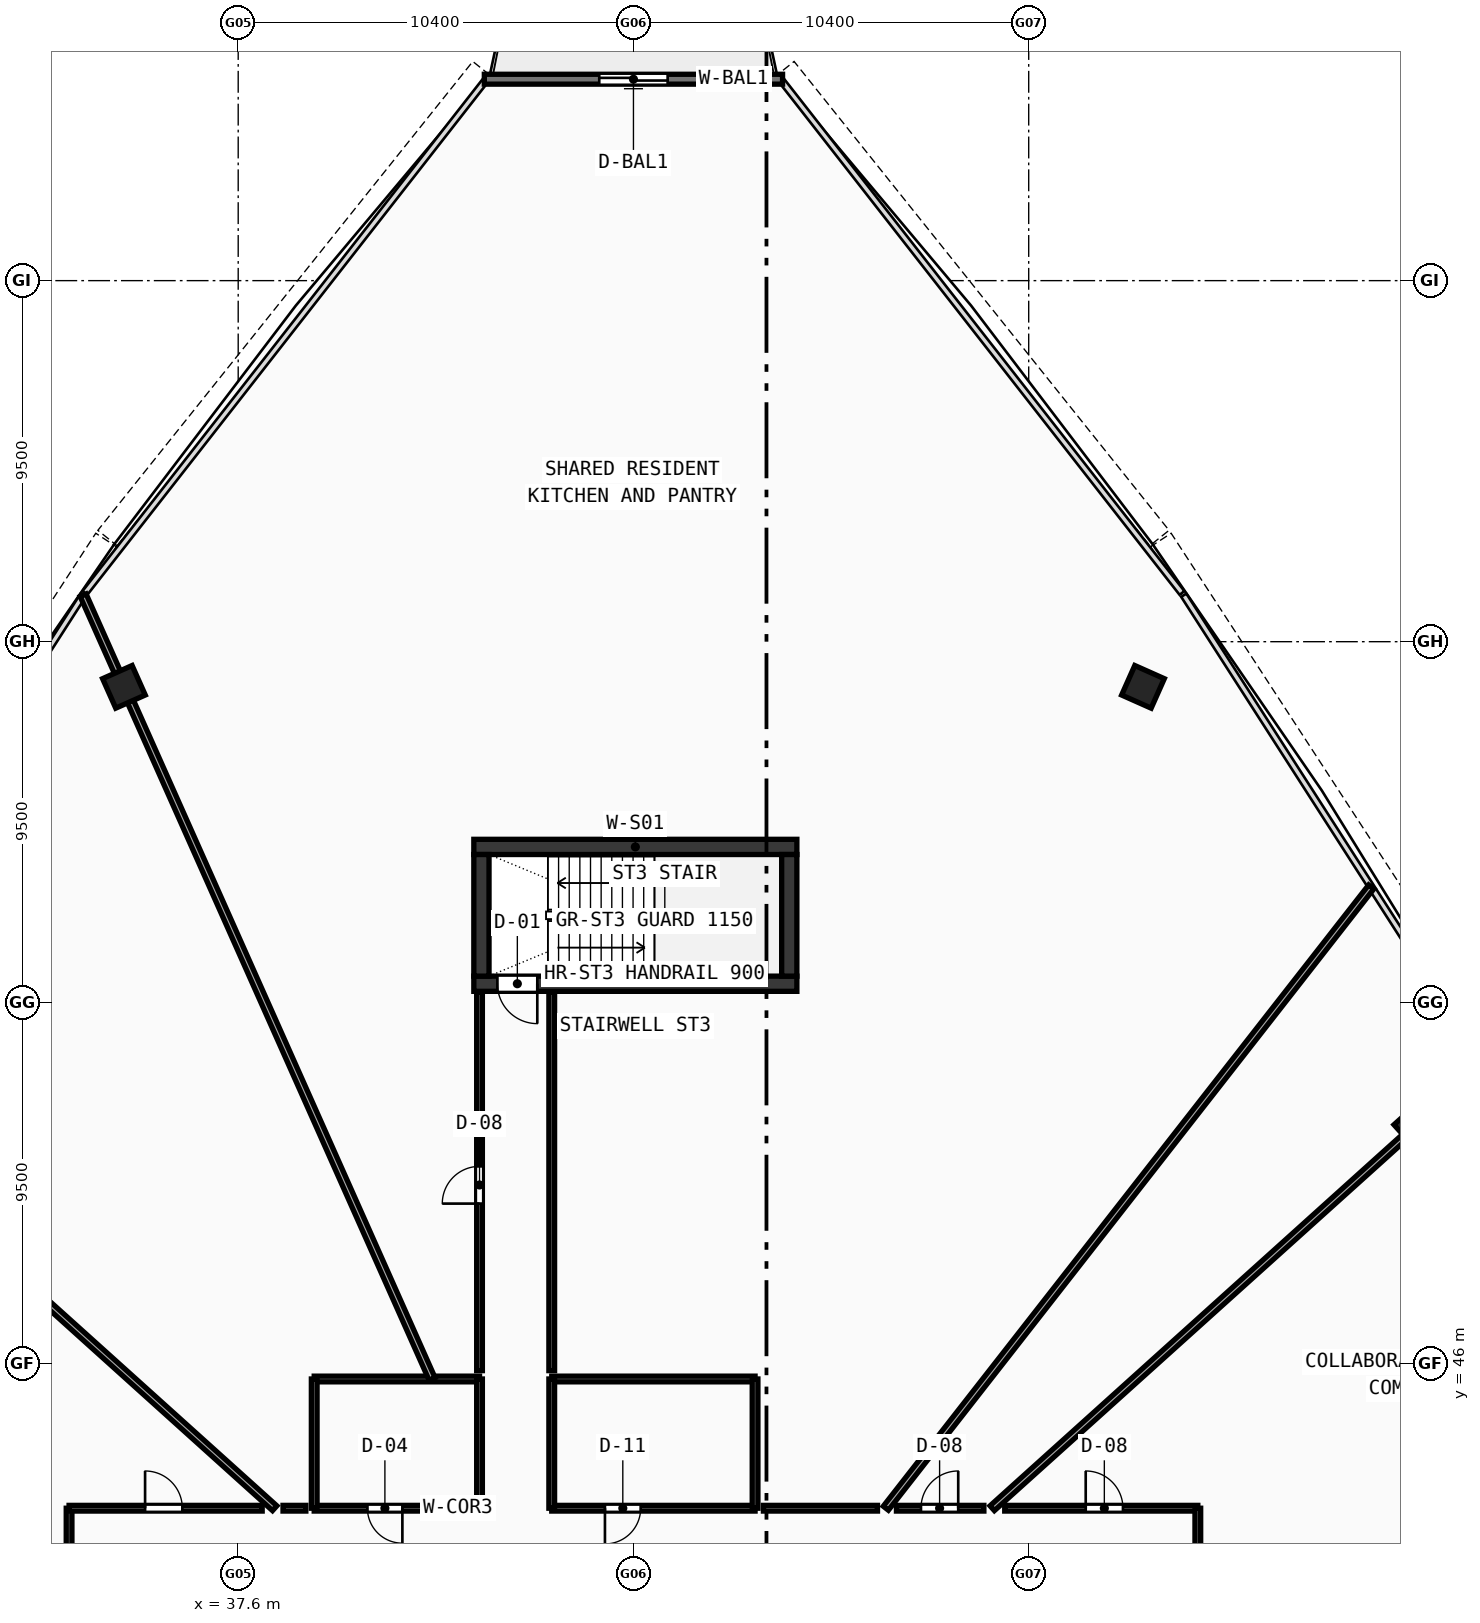
"""IFC4 building model, lengths in metres.
Left out: names, types, materials, properties, quantities, classifications, styles, units other than length and angle.
Written with IfcOpenShell. Run it as: python <this file> out.ifc"""

import sys

from ifc_helpers import new_model, si_unit, direction, frame, frame_2d, origin, origin_with_axes, origin_2d, place, context, subcontext, project, spatial, rectangle, hollow_rectangle, extrude, source, transform, mapped, element, fill, save


model = new_model("IFC4")
c1 = context("Model", 3, precision=1e-05, world=origin(), true_north=direction((0.0, 1.0)))
c2 = subcontext(c1, "Body", "Model", "MODEL_VIEW")
j1 = project(units=[si_unit("LENGTHUNIT", "METRE"), si_unit("PLANEANGLEUNIT", "RADIAN")], contexts=[c1])
p1 = place(None, origin())
s1 = spatial("IfcSite", under=j1, at=p1, CompositionType="ELEMENT")
p2 = place(p1, origin())
s2 = spatial("IfcBuilding", under=s1, at=p2, CompositionType="ELEMENT")
p3 = place(p2, frame((0.0, 0.0, 244.53)))
s3 = spatial("IfcBuildingStorey", under=s2, at=p3, CompositionType="ELEMENT", Elevation=244.53)
p4 = place(p3, frame((43.8, 59.6, 0.0), z_axis=(0.0, 0.0, 1.0), x_axis=(1.0, 0.0, 0.0)))
e1 = element("IfcWall", 1, at=p4, inside=s3, PredefinedType="SHEAR", context=c2, shape_type="SweptSolid", body=[
    extrude(rectangle(XDim=8.5, YDim=0.4, at=frame_2d((4.25, 0.0))), origin(), (0.0, 0.0, 1.0), 3.47),
])
p5 = place(p3, frame((43.8, 56.0, 0.0), z_axis=(0.0, 0.0, 1.0), x_axis=(1.0, 0.0, 0.0)))
e2 = element("IfcWall", 2, at=p5, inside=s3, PredefinedType="SHEAR", context=c2, shape_type="SweptSolid", body=[
    extrude(rectangle(XDim=8.5, YDim=0.4, at=frame_2d((4.25, 0.0))), origin(), (0.0, 0.0, 1.0), 3.47),
])
p6 = place(p5, frame((0.62, 0.0, 0.0)))
e3 = element("IfcOpeningElement", 3, at=p6, cuts=e2, PredefinedType="OPENING", context=c2, shape_type="SweptSolid", body=[
    extrude(rectangle(XDim=1.05, YDim=2.1, at=frame_2d((0.525, 1.05))), frame((0.0, 0.21, 0.0), z_axis=(0.0, -1.0, 0.0), x_axis=(1.0, 0.0, 0.0)), (0.0, 0.0, 1.0), 0.42),
])
for number, where, z_axis, x_axis in (
    (4, (44.0, 56.2, 0.0), (0.0, 0.0, 1.0), (0.0, 1.0, 0.0)),
    (5, (52.1, 56.2, 0.0), (0.0, 0.0, 1.0), (0.0, 1.0, 0.0)),
):
    element("IfcWall", number, at=place(p3, frame(where, z_axis=z_axis, x_axis=x_axis)), inside=s3, PredefinedType="SHEAR", context=c2, shape_type="SweptSolid", body=[
        extrude(rectangle(XDim=3.2, YDim=0.4, at=frame_2d((1.6, 0.0))), origin(), (0.0, 0.0, 1.0), 3.47),
    ])
m1 = source(origin(), c2, "Body", "SweptSolid", [
    extrude(hollow_rectangle(XDim=0.85, YDim=0.85, WallThickness=0.034, at=origin_2d()), origin(), (0.0, 0.0, 1.0), 3.73),
])
for number, where, z_axis, x_axis in (
    (6, (68.612, 52.259, -0.26), (0.0, 0.0, 1.0), (-0.669, 0.743, 0.0)),
    (7, (61.407, 63.812, -0.26), (0.0, 0.0, 1.0), (-0.914, 0.407, 0.0)),
    (8, (34.593, 63.812, -0.26), (0.0, 0.0, 1.0), (-0.914, -0.407, 0.0)),
):
    element("IfcColumn", number, at=place(p3, frame(where, z_axis=z_axis, x_axis=x_axis)), inside=s3, PredefinedType="COLUMN", context=c2, shape_type="MappedRepresentation", body=[
        mapped(m1, transform((0.0, 0.0, 0.0), scale=1.0)),
    ])
p7 = place(p3, frame((51.924, 79.8, 0.0), z_axis=(0.0, 0.0, 1.0), x_axis=(-1.0, 0.0, 0.0)))
e9 = element("IfcWall", 9, at=p7, inside=s3, PredefinedType="STANDARD", context=c2, shape_type="SweptSolid", body=[
    extrude(rectangle(XDim=7.847, YDim=0.26, at=frame_2d((3.924, 0.0))), origin(), (0.0, 0.0, 1.0), 3.47),
])
p8 = place(p7, frame((3.024, 0.0, 0.0)))
e10 = element("IfcOpeningElement", 10, at=p8, cuts=e9, PredefinedType="OPENING", context=c2, shape_type="SweptSolid", body=[
    extrude(rectangle(XDim=1.8, YDim=2.15, at=frame_2d((0.9, 1.075))), frame((0.0, 0.14, 0.0), z_axis=(0.0, -1.0, 0.0), x_axis=(1.0, 0.0, 0.0)), (0.0, 0.0, 1.0), 0.28),
])
p9 = place(p3, frame((39.6, 42.2, 0.0), z_axis=(0.0, 0.0, 1.0), x_axis=(1.0, 0.0, 0.0)))
e11 = element("IfcWall", 11, at=p9, inside=s3, PredefinedType="PARTITIONING", context=c2, shape_type="SweptSolid", body=[
    extrude(rectangle(XDim=4.35, YDim=0.15, at=frame_2d((2.175, 0.0))), origin(), (0.0, 0.0, 1.0), 3.47),
])
p10 = place(p9, frame((1.4, 0.0, 0.0)))
e12 = element("IfcOpeningElement", 12, at=p10, cuts=e11, PredefinedType="OPENING", context=c2, shape_type="SweptSolid", body=[
    extrude(rectangle(XDim=0.92, YDim=2.1, at=frame_2d((0.46, 1.05))), frame((0.0, 0.085, 0.0), z_axis=(0.0, -1.0, 0.0), x_axis=(1.0, 0.0, 0.0)), (0.0, 0.0, 1.0), 0.17),
])
p11 = place(p3, frame((39.6, 45.6, 0.0), z_axis=(0.0, 0.0, 1.0), x_axis=(1.0, 0.0, 0.0)))
e13 = element("IfcWall", 13, at=p11, inside=s3, PredefinedType="PARTITIONING", context=c2, shape_type="SweptSolid", body=[
    extrude(rectangle(XDim=4.35, YDim=0.15, at=frame_2d((2.175, 0.0))), origin(), (0.0, 0.0, 1.0), 2.82),
])
p12 = place(p3, frame((39.6, 42.2, 0.0), z_axis=(0.0, 0.0, 1.0), x_axis=(0.0, 1.0, 0.0)))
e14 = element("IfcWall", 14, at=p12, inside=s3, PredefinedType="PARTITIONING", context=c2, shape_type="SweptSolid", body=[
    extrude(rectangle(XDim=3.4, YDim=0.15, at=frame_2d((1.7, 0.0))), origin(), (0.0, 0.0, 1.0), 3.47),
])
p13 = place(p3, frame((43.95, 42.2, 0.0), z_axis=(0.0, 0.0, 1.0), x_axis=(0.0, 1.0, 0.0)))
e15 = element("IfcWall", 15, at=p13, inside=s3, PredefinedType="PARTITIONING", context=c2, shape_type="SweptSolid", body=[
    extrude(rectangle(XDim=3.4, YDim=0.15, at=frame_2d((1.7, 0.0))), origin(), (0.0, 0.0, 1.0), 2.82),
])
p14 = place(p3, frame((45.85, 42.2, 0.0), z_axis=(0.0, 0.0, 1.0), x_axis=(1.0, 0.0, 0.0)))
e16 = element("IfcWall", 16, at=p14, inside=s3, PredefinedType="PARTITIONING", context=c2, shape_type="SweptSolid", body=[
    extrude(rectangle(XDim=5.35, YDim=0.15, at=frame_2d((2.675, 0.0))), origin(), (0.0, 0.0, 1.0), 3.47),
])
p15 = place(p14, frame((1.4, 0.0, 0.0)))
e17 = element("IfcOpeningElement", 17, at=p15, cuts=e16, PredefinedType="OPENING", context=c2, shape_type="SweptSolid", body=[
    extrude(rectangle(XDim=0.94, YDim=2.1, at=frame_2d((0.47, 1.05))), frame((0.0, 0.085, 0.0), z_axis=(0.0, -1.0, 0.0), x_axis=(1.0, 0.0, 0.0)), (0.0, 0.0, 1.0), 0.17),
])
p16 = place(p3, frame((45.85, 45.6, 0.0), z_axis=(0.0, 0.0, 1.0), x_axis=(1.0, 0.0, 0.0)))
e18 = element("IfcWall", 18, at=p16, inside=s3, PredefinedType="PARTITIONING", context=c2, shape_type="SweptSolid", body=[
    extrude(rectangle(XDim=5.35, YDim=0.15, at=frame_2d((2.675, 0.0))), origin(), (0.0, 0.0, 1.0), 3.47),
])
for number, where, z_axis, x_axis in (
    (19, (45.85, 42.2, 0.0), (0.0, 0.0, 1.0), (0.0, 1.0, 0.0)),
    (20, (51.2, 42.2, 0.0), (0.0, 0.0, 1.0), (0.0, 1.0, 0.0)),
):
    element("IfcWall", number, at=place(p3, frame(where, z_axis=z_axis, x_axis=x_axis)), inside=s3, PredefinedType="PARTITIONING", context=c2, shape_type="SweptSolid", body=[
        extrude(rectangle(XDim=3.4, YDim=0.15, at=frame_2d((1.7, 0.0))), origin(), (0.0, 0.0, 1.0), 3.47),
    ])
p17 = place(p3, frame((62.85, 38.525, 0.0), z_axis=(0.0, 0.0, 1.0), x_axis=(0.951060404644, 0.309005027011, 0.0)))
e21 = element("IfcWall", 21, at=p17, inside=s3, PredefinedType="PARTITIONING", context=c2, shape_type="SweptSolid", body=[
    extrude(rectangle(XDim=14.032, YDim=0.17, at=frame_2d((7.016, 0.0))), origin(), (0.0, 0.0, 1.0), 2.82),
])
p18 = place(p3, frame((57.44, 42.2, 0.0), z_axis=(0.0, 0.0, 1.0), x_axis=(0.743140424774, 0.669135493802, 0.0)))
e22 = element("IfcWall", 22, at=p18, inside=s3, PredefinedType="PARTITIONING", context=c2, shape_type="SweptSolid", body=[
    extrude(rectangle(XDim=17.455, YDim=0.17, at=frame_2d((8.728, 0.0))), origin(), (0.0, 0.0, 1.0), 2.82),
])
p19 = place(p3, frame((54.641, 42.2, 0.0), z_axis=(0.0, 0.0, 1.0), x_axis=(0.615664824624, 0.788008136837, 0.0)))
e23 = element("IfcWall", 23, at=p19, inside=s3, PredefinedType="PARTITIONING", context=c2, shape_type="SweptSolid", body=[
    extrude(rectangle(XDim=20.745, YDim=0.17, at=frame_2d((10.372, 0.0))), origin(), (0.0, 0.0, 1.0), 2.82),
])
p20 = place(p3, frame((42.702, 45.6, 0.0), z_axis=(0.0, 0.0, 1.0), x_axis=(-0.406745472033, 0.913541526686, 0.0)))
e24 = element("IfcWall", 24, at=p20, inside=s3, PredefinedType="PARTITIONING", context=c2, shape_type="SweptSolid", body=[
    extrude(rectangle(XDim=22.574, YDim=0.17, at=frame_2d((11.287, 0.0))), origin(), (0.0, 0.0, 1.0), 2.82),
])
p21 = place(p3, frame((38.56, 42.2, 0.0), z_axis=(0.0, 0.0, 1.0), x_axis=(-0.743140424774, 0.669135493802, 0.0)))
e25 = element("IfcWall", 25, at=p21, inside=s3, PredefinedType="PARTITIONING", context=c2, shape_type="SweptSolid", body=[
    extrude(rectangle(XDim=17.455, YDim=0.17, at=frame_2d((8.728, 0.0))), origin(), (0.0, 0.0, 1.0), 2.82),
])
p22 = place(p3, frame((33.15, 38.525, 0.0), z_axis=(0.0, 0.0, 1.0), x_axis=(-0.951060404644, 0.309005027011, 0.0)))
e26 = element("IfcWall", 26, at=p22, inside=s3, PredefinedType="PARTITIONING", context=c2, shape_type="SweptSolid", body=[
    extrude(rectangle(XDim=14.032, YDim=0.17, at=frame_2d((7.016, 0.0))), origin(), (0.0, 0.0, 1.0), 2.82),
])
p23 = place(p3, frame((33.15, 38.756, 0.0), z_axis=(0.0, 0.0, 1.0), x_axis=(0.0, 1.0, 0.0)))
e27 = element("IfcWall", 27, at=p23, inside=s3, PredefinedType="PARTITIONING", context=c2, shape_type="SweptSolid", body=[
    extrude(rectangle(XDim=3.444, YDim=0.15, at=frame_2d((1.722, 0.0))), origin(), (0.0, 0.0, 1.0), 3.12),
])
p24 = place(p3, frame((33.15, 42.2, 0.0), z_axis=(0.0, 0.0, 1.0), x_axis=(1.0, 0.0, 0.0)))
e28 = element("IfcWall", 28, at=p24, inside=s3, PredefinedType="PARTITIONING", context=c2, shape_type="SweptSolid", body=[
    extrude(rectangle(XDim=5.081, YDim=0.15, at=frame_2d((2.541, 0.0))), origin(), (0.0, 0.0, 1.0), 3.12),
])
p25 = place(p24, frame((2.0, 0.0, 0.0)))
e29 = element("IfcOpeningElement", 29, at=p25, cuts=e28, PredefinedType="OPENING", context=c2, shape_type="SweptSolid", body=[
    extrude(rectangle(XDim=0.98, YDim=2.12, at=frame_2d((0.49, 1.06))), frame((0.0, 0.085, 0.0), z_axis=(0.0, -1.0, 0.0), x_axis=(1.0, 0.0, 0.0)), (0.0, 0.0, 1.0), 0.17),
])
p26 = place(p3, frame((38.78, 42.2, 0.0), z_axis=(0.0, 0.0, 1.0), x_axis=(1.0, 0.0, 0.0)))
e30 = element("IfcWall", 30, at=p26, inside=s3, PredefinedType="PARTITIONING", context=c2, shape_type="SweptSolid", body=[
    extrude(rectangle(XDim=0.6, YDim=0.15, at=frame_2d((0.3, 0.0))), origin(), (0.0, 0.0, 1.0), 2.82),
])
p27 = place(p3, frame((43.95, 45.82, 0.0), z_axis=(0.0, 0.0, 1.0), x_axis=(0.0, 1.0, 0.0)))
e31 = element("IfcWall", 31, at=p27, inside=s3, PredefinedType="PARTITIONING", context=c2, shape_type="SweptSolid", body=[
    extrude(rectangle(XDim=9.96, YDim=0.15, at=frame_2d((4.98, 0.0))), origin(), (0.0, 0.0, 1.0), 3.12),
])
p28 = place(p27, frame((4.395, 0.0, 0.0)))
e32 = element("IfcOpeningElement", 32, at=p28, cuts=e31, PredefinedType="OPENING", context=c2, shape_type="SweptSolid", body=[
    extrude(rectangle(XDim=0.98, YDim=2.12, at=frame_2d((0.49, 1.06))), frame((0.0, 0.085, 0.0), z_axis=(0.0, -1.0, 0.0), x_axis=(1.0, 0.0, 0.0)), (0.0, 0.0, 1.0), 0.17),
])
p29 = place(p3, frame((45.85, 55.78, 0.0), z_axis=(0.0, 0.0, 1.0), x_axis=(0.0, -1.0, 0.0)))
e33 = element("IfcWall", 33, at=p29, inside=s3, PredefinedType="PARTITIONING", context=c2, shape_type="SweptSolid", body=[
    extrude(rectangle(XDim=9.96, YDim=0.15, at=frame_2d((4.98, 0.0))), origin(), (0.0, 0.0, 1.0), 3.12),
])
p30 = place(p3, frame((51.42, 42.2, 0.0), z_axis=(0.0, 0.0, 1.0), x_axis=(1.0, 0.0, 0.0)))
e34 = element("IfcWall", 34, at=p30, inside=s3, PredefinedType="PARTITIONING", context=c2, shape_type="SweptSolid", body=[
    extrude(rectangle(XDim=3.001, YDim=0.15, at=frame_2d((1.5, 0.0))), origin(), (0.0, 0.0, 1.0), 2.82),
])
p31 = place(p3, frame((54.92, 42.2, 0.0), z_axis=(0.0, 0.0, 1.0), x_axis=(1.0, 0.0, 0.0)))
e35 = element("IfcWall", 35, at=p31, inside=s3, PredefinedType="PARTITIONING", context=c2, shape_type="SweptSolid", body=[
    extrude(rectangle(XDim=2.3, YDim=0.15, at=frame_2d((1.15, 0.0))), origin(), (0.0, 0.0, 1.0), 2.82),
])
p32 = place(p31, frame((0.646, 0.0, 0.0)))
e36 = element("IfcOpeningElement", 36, at=p32, cuts=e35, PredefinedType="OPENING", context=c2, shape_type="SweptSolid", body=[
    extrude(rectangle(XDim=0.98, YDim=2.12, at=frame_2d((0.49, 1.06))), frame((0.0, 0.085, 0.0), z_axis=(0.0, -1.0, 0.0), x_axis=(1.0, 0.0, 0.0)), (0.0, 0.0, 1.0), 0.17),
])
p33 = place(p3, frame((57.769, 42.2, 0.0), z_axis=(0.0, 0.0, 1.0), x_axis=(1.0, 0.0, 0.0)))
e37 = element("IfcWall", 37, at=p33, inside=s3, PredefinedType="PARTITIONING", context=c2, shape_type="SweptSolid", body=[
    extrude(rectangle(XDim=5.081, YDim=0.15, at=frame_2d((2.541, 0.0))), origin(), (0.0, 0.0, 1.0), 3.12),
])
p34 = place(p33, frame((2.131, 0.0, 0.0)))
e38 = element("IfcOpeningElement", 38, at=p34, cuts=e37, PredefinedType="OPENING", context=c2, shape_type="SweptSolid", body=[
    extrude(rectangle(XDim=0.98, YDim=2.12, at=frame_2d((0.49, 1.06))), frame((0.0, 0.085, 0.0), z_axis=(0.0, -1.0, 0.0), x_axis=(1.0, 0.0, 0.0)), (0.0, 0.0, 1.0), 0.17),
])
p35 = place(p3, frame((62.85, 42.2, 0.0), z_axis=(0.0, 0.0, 1.0), x_axis=(0.0, -1.0, 0.0)))
e39 = element("IfcWall", 39, at=p35, inside=s3, PredefinedType="PARTITIONING", context=c2, shape_type="SweptSolid", body=[
    extrude(rectangle(XDim=3.444, YDim=0.15, at=frame_2d((1.722, 0.0))), origin(), (0.0, 0.0, 1.0), 3.12),
])
m2 = source(origin(), c2, "Body", "SweptSolid", [
    extrude(rectangle(XDim=1.8, YDim=2.15, at=frame_2d((0.9, 1.075))), frame((0.0, 0.025, 0.0), z_axis=(0.0, -1.0, 0.0), x_axis=(1.0, 0.0, 0.0)), (0.0, 0.0, 1.0), 0.05),
])
p36 = place(p8, origin_with_axes())
e40 = element("IfcDoor", 40, at=p36, inside=s3, OperationType="DOUBLE_DOOR_SLIDING", PredefinedType="DOOR", context=c2, shape_type="MappedRepresentation", body=[
    mapped(m2, transform((0.0, 0.0, 0.0), scale=1.0)),
])
fill(e10, e40)
m3 = source(origin(), c2, "Body", "SweptSolid", [
    extrude(rectangle(XDim=1.05, YDim=2.1, at=frame_2d((0.525, 1.05))), frame((0.0, 0.025, 0.0), z_axis=(0.0, -1.0, 0.0), x_axis=(1.0, 0.0, 0.0)), (0.0, 0.0, 1.0), 0.05),
])
p37 = place(p6, frame((1.05, 0.0, 0.0), z_axis=(0.0, 0.0, 1.0), x_axis=(-1.0, 0.0, 0.0)))
e41 = element("IfcDoor", 41, at=p37, inside=s3, OperationType="SINGLE_SWING_LEFT", PredefinedType="DOOR", context=c2, shape_type="MappedRepresentation", body=[
    mapped(m3, transform((0.0, 0.0, 0.0), scale=1.0)),
])
fill(e3, e41)
m4 = source(origin(), c2, "Body", "SweptSolid", [
    extrude(rectangle(XDim=0.92, YDim=2.1, at=frame_2d((0.46, 1.05))), frame((0.0, 0.025, 0.0), z_axis=(0.0, -1.0, 0.0), x_axis=(1.0, 0.0, 0.0)), (0.0, 0.0, 1.0), 0.05),
])
p38 = place(p10, frame((0.92, 0.0, 0.0), z_axis=(0.0, 0.0, 1.0), x_axis=(-1.0, 0.0, 0.0)))
e42 = element("IfcDoor", 42, at=p38, inside=s3, OperationType="SINGLE_SWING_LEFT", PredefinedType="DOOR", context=c2, shape_type="MappedRepresentation", body=[
    mapped(m4, transform((0.0, 0.0, 0.0), scale=1.0)),
])
fill(e12, e42)
m5 = source(origin(), c2, "Body", "SweptSolid", [
    extrude(rectangle(XDim=0.94, YDim=2.1, at=frame_2d((0.47, 1.05))), frame((0.0, 0.025, 0.0), z_axis=(0.0, -1.0, 0.0), x_axis=(1.0, 0.0, 0.0)), (0.0, 0.0, 1.0), 0.05),
])
p39 = place(p15, frame((0.94, 0.0, 0.0), z_axis=(0.0, 0.0, 1.0), x_axis=(-1.0, 0.0, 0.0)))
e43 = element("IfcDoor", 43, at=p39, inside=s3, OperationType="SINGLE_SWING_RIGHT", PredefinedType="DOOR", context=c2, shape_type="MappedRepresentation", body=[
    mapped(m5, transform((0.0, 0.0, 0.0), scale=1.0)),
])
fill(e17, e43)
m6 = source(origin(), c2, "Body", "SweptSolid", [
    extrude(rectangle(XDim=0.98, YDim=2.12, at=frame_2d((0.49, 1.06))), frame((0.0, 0.025, 0.0), z_axis=(0.0, -1.0, 0.0), x_axis=(1.0, 0.0, 0.0)), (0.0, 0.0, 1.0), 0.05),
])
p40 = place(p34, origin_with_axes())
e44 = element("IfcDoor", 44, at=p40, inside=s3, OperationType="SINGLE_SWING_LEFT", PredefinedType="DOOR", context=c2, shape_type="MappedRepresentation", body=[
    mapped(m6, transform((0.0, 0.0, 0.0), scale=1.0)),
])
fill(e38, e44)
p41 = place(p32, origin_with_axes())
e45 = element("IfcDoor", 45, at=p41, inside=s3, OperationType="SINGLE_SWING_RIGHT", PredefinedType="DOOR", context=c2, shape_type="MappedRepresentation", body=[
    mapped(m6, transform((0.0, 0.0, 0.0), scale=1.0)),
])
fill(e36, e45)
p42 = place(p28, origin_with_axes())
e46 = element("IfcDoor", 46, at=p42, inside=s3, OperationType="SINGLE_SWING_LEFT", PredefinedType="DOOR", context=c2, shape_type="MappedRepresentation", body=[
    mapped(m6, transform((0.0, 0.0, 0.0), scale=1.0)),
])
fill(e32, e46)
p43 = place(p25, origin_with_axes())
e47 = element("IfcDoor", 47, at=p43, inside=s3, OperationType="SINGLE_SWING_LEFT", PredefinedType="DOOR", context=c2, shape_type="MappedRepresentation", body=[
    mapped(m6, transform((0.0, 0.0, 0.0), scale=1.0)),
])
fill(e29, e47)
save(model, sys.argv[1])
